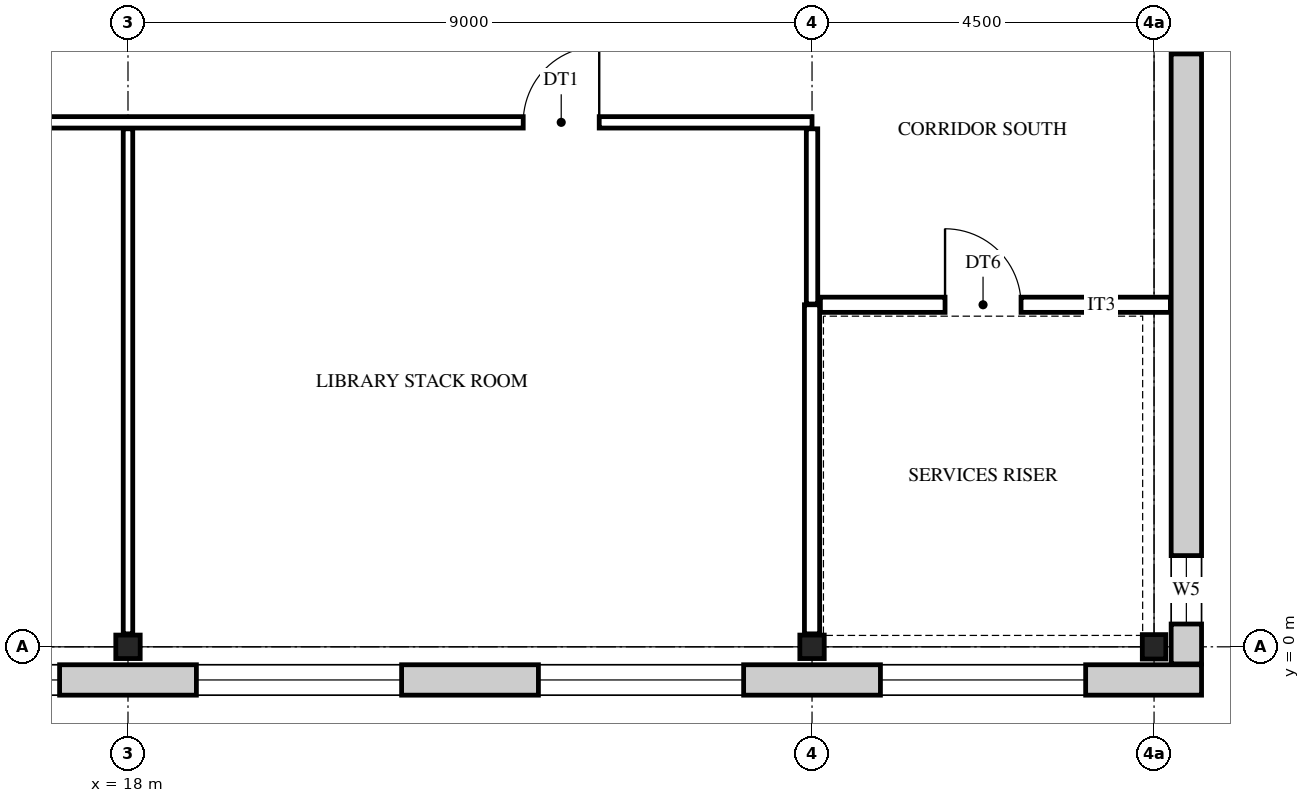
"""IFC4 building model, lengths in metres.
Left out: names, types, materials, properties, quantities, classifications, styles, units other than length and angle.
Written with IfcOpenShell. Run it as: python <this file> out.ifc"""

import sys

from ifc_helpers import new_model, si_unit, direction, frame, frame_2d, origin, origin_2d, place, context, subcontext, project, spatial, rectangle, i_section, extrude, element, fill, save


model = new_model("IFC4")
c1 = context("Model", 3, precision=1e-05, world=origin(), true_north=direction((0.0, 1.0)))
c2 = subcontext(c1, "Body", "Model", "MODEL_VIEW")
j1 = project(units=[si_unit("LENGTHUNIT", "METRE"), si_unit("PLANEANGLEUNIT", "RADIAN")], contexts=[c1])
p1 = place(None, origin())
s1 = spatial("IfcSite", under=j1, at=p1, CompositionType="ELEMENT")
p2 = place(p1, origin())
s2 = spatial("IfcBuilding", under=s1, at=p2, CompositionType="ELEMENT")
p3 = place(p2, frame((0.0, 0.0, 48.6)))
s3 = spatial("IfcBuildingStorey", under=s2, at=p3, CompositionType="ELEMENT", Elevation=48.6)
for number, where, z_axis, x_axis in (
    (1, (18.0, 0.0, 0.0), (0.0, 0.0, 1.0), (0.0, 1.0, 0.0)),
    (2, (27.0, 0.0, 0.0), (0.0, 0.0, 1.0), (0.0, 1.0, 0.0)),
    (3, (31.5, 0.0, 0.0), (0.0, 0.0, 1.0), (1.0, 0.0, 0.0)),
):
    element("IfcColumn", number, at=place(p3, frame(where, z_axis=z_axis, x_axis=x_axis)), inside=s3, PredefinedType="COLUMN", context=c2, shape_type="SweptSolid", body=[
        extrude(i_section(OverallWidth=0.309, OverallDepth=0.321, WebThickness=0.014, FlangeThickness=0.022, FilletRadius=0.017, at=origin_2d()), origin(), (0.0, 0.0, 1.0), 4.2),
    ])
p4 = place(p3, frame((32.125, -0.436, 0.0), z_axis=(0.0, 0.0, 1.0), x_axis=(-1.0, 0.0, 0.0)))
e4 = element("IfcWall", 4, at=p4, inside=s3, PredefinedType="STANDARD", context=c2, shape_type="SweptSolid", body=[
    extrude(rectangle(XDim=32.75, YDim=0.4, at=frame_2d((16.375, 0.0))), origin(), (0.0, 0.0, 1.0), 4.2),
])
p5 = place(p4, frame((28.525, 0.0, 0.9)))
e5 = element("IfcOpeningElement", 5, at=p5, cuts=e4, PredefinedType="OPENING", context=c2, shape_type="SweptSolid", body=[
    extrude(rectangle(XDim=2.7, YDim=2.5, at=frame_2d((1.35, 1.25))), frame((0.0, 0.21, 0.0), z_axis=(0.0, -1.0, 0.0), x_axis=(1.0, 0.0, 0.0)), (0.0, 0.0, 1.0), 0.42),
])
p6 = place(p4, frame((24.025, 0.0, 0.9)))
e6 = element("IfcOpeningElement", 6, at=p6, cuts=e4, PredefinedType="OPENING", context=c2, shape_type="SweptSolid", body=[
    extrude(rectangle(XDim=2.7, YDim=2.5, at=frame_2d((1.35, 1.25))), frame((0.0, 0.21, 0.0), z_axis=(0.0, -1.0, 0.0), x_axis=(1.0, 0.0, 0.0)), (0.0, 0.0, 1.0), 0.42),
])
p7 = place(p4, frame((19.525, 0.0, 0.9)))
e7 = element("IfcOpeningElement", 7, at=p7, cuts=e4, PredefinedType="OPENING", context=c2, shape_type="SweptSolid", body=[
    extrude(rectangle(XDim=2.7, YDim=2.5, at=frame_2d((1.35, 1.25))), frame((0.0, 0.21, 0.0), z_axis=(0.0, -1.0, 0.0), x_axis=(1.0, 0.0, 0.0)), (0.0, 0.0, 1.0), 0.42),
])
p8 = place(p4, frame((15.025, 0.0, 0.9)))
e8 = element("IfcOpeningElement", 8, at=p8, cuts=e4, PredefinedType="OPENING", context=c2, shape_type="SweptSolid", body=[
    extrude(rectangle(XDim=2.7, YDim=2.5, at=frame_2d((1.35, 1.25))), frame((0.0, 0.21, 0.0), z_axis=(0.0, -1.0, 0.0), x_axis=(1.0, 0.0, 0.0)), (0.0, 0.0, 1.0), 0.42),
])
p9 = place(p4, frame((10.525, 0.0, 0.9)))
e9 = element("IfcOpeningElement", 9, at=p9, cuts=e4, PredefinedType="OPENING", context=c2, shape_type="SweptSolid", body=[
    extrude(rectangle(XDim=2.7, YDim=2.5, at=frame_2d((1.35, 1.25))), frame((0.0, 0.21, 0.0), z_axis=(0.0, -1.0, 0.0), x_axis=(1.0, 0.0, 0.0)), (0.0, 0.0, 1.0), 0.42),
])
p10 = place(p4, frame((6.025, 0.0, 0.9)))
e10 = element("IfcOpeningElement", 10, at=p10, cuts=e4, PredefinedType="OPENING", context=c2, shape_type="SweptSolid", body=[
    extrude(rectangle(XDim=2.7, YDim=2.5, at=frame_2d((1.35, 1.25))), frame((0.0, 0.21, 0.0), z_axis=(0.0, -1.0, 0.0), x_axis=(1.0, 0.0, 0.0)), (0.0, 0.0, 1.0), 0.42),
])
p11 = place(p4, frame((1.525, 0.0, 0.9)))
e11 = element("IfcOpeningElement", 11, at=p11, cuts=e4, PredefinedType="OPENING", context=c2, shape_type="SweptSolid", body=[
    extrude(rectangle(XDim=2.7, YDim=2.5, at=frame_2d((1.35, 1.25))), frame((0.0, 0.21, 0.0), z_axis=(0.0, -1.0, 0.0), x_axis=(1.0, 0.0, 0.0)), (0.0, 0.0, 1.0), 0.42),
])
p12 = place(p3, frame((31.925, 27.225, 0.0), z_axis=(0.0, 0.0, 1.0), x_axis=(0.0, -1.0, 0.0)))
e12 = element("IfcWall", 12, at=p12, inside=s3, PredefinedType="STANDARD", context=c2, shape_type="SweptSolid", body=[
    extrude(rectangle(XDim=27.45, YDim=0.4, at=frame_2d((13.725, 0.0))), origin(), (0.0, 0.0, 1.0), 4.2),
])
p13 = place(p12, frame((26.025, 0.0, 0.9)))
e13 = element("IfcOpeningElement", 13, at=p13, cuts=e12, PredefinedType="OPENING", context=c2, shape_type="SweptSolid", body=[
    extrude(rectangle(XDim=0.9, YDim=2.0, at=frame_2d((0.45, 1.0))), frame((0.0, 0.21, 0.0), z_axis=(0.0, -1.0, 0.0), x_axis=(1.0, 0.0, 0.0)), (0.0, 0.0, 1.0), 0.42),
])
p14 = place(p12, frame((18.525, 0.0, 0.9)))
e14 = element("IfcOpeningElement", 14, at=p14, cuts=e12, PredefinedType="OPENING", context=c2, shape_type="SweptSolid", body=[
    extrude(rectangle(XDim=0.9, YDim=2.0, at=frame_2d((0.45, 1.0))), frame((0.0, 0.21, 0.0), z_axis=(0.0, -1.0, 0.0), x_axis=(1.0, 0.0, 0.0)), (0.0, 0.0, 1.0), 0.42),
])
p15 = place(p12, frame((15.675, 0.0, 1.6)))
e15 = element("IfcOpeningElement", 15, at=p15, cuts=e12, PredefinedType="OPENING", context=c2, shape_type="SweptSolid", body=[
    extrude(rectangle(XDim=0.6, YDim=0.9, at=frame_2d((0.3, 0.45))), frame((0.0, 0.21, 0.0), z_axis=(0.0, -1.0, 0.0), x_axis=(1.0, 0.0, 0.0)), (0.0, 0.0, 1.0), 0.42),
])
p16 = place(p12, frame((11.175, 0.0, 1.6)))
e16 = element("IfcOpeningElement", 16, at=p16, cuts=e12, PredefinedType="OPENING", context=c2, shape_type="SweptSolid", body=[
    extrude(rectangle(XDim=0.6, YDim=0.9, at=frame_2d((0.3, 0.45))), frame((0.0, 0.21, 0.0), z_axis=(0.0, -1.0, 0.0), x_axis=(1.0, 0.0, 0.0)), (0.0, 0.0, 1.0), 0.42),
])
p17 = place(p12, frame((8.025, 0.0, 0.9)))
e17 = element("IfcOpeningElement", 17, at=p17, cuts=e12, PredefinedType="OPENING", context=c2, shape_type="SweptSolid", body=[
    extrude(rectangle(XDim=0.9, YDim=2.0, at=frame_2d((0.45, 1.0))), frame((0.0, 0.21, 0.0), z_axis=(0.0, -1.0, 0.0), x_axis=(1.0, 0.0, 0.0)), (0.0, 0.0, 1.0), 0.42),
])
p18 = place(p12, frame((0.525, 0.0, 0.9)))
e18 = element("IfcOpeningElement", 18, at=p18, cuts=e12, PredefinedType="OPENING", context=c2, shape_type="SweptSolid", body=[
    extrude(rectangle(XDim=0.9, YDim=2.0, at=frame_2d((0.45, 1.0))), frame((0.0, 0.21, 0.0), z_axis=(0.0, -1.0, 0.0), x_axis=(1.0, 0.0, 0.0)), (0.0, 0.0, 1.0), 0.42),
])
p19 = place(p3, frame((18.0, 0.17, 0.0), z_axis=(0.0, 0.0, 1.0), x_axis=(0.0, 1.0, 0.0)))
e19 = element("IfcWall", 19, at=p19, inside=s3, PredefinedType="PARTITIONING", context=c2, shape_type="SweptSolid", body=[
    extrude(rectangle(XDim=6.645, YDim=0.125, at=frame_2d((3.322, 0.0))), origin(), (0.0, 0.0, 1.0), 3.542),
])
p20 = place(p3, frame((27.0, 0.17, 0.0), z_axis=(0.0, 0.0, 1.0), x_axis=(0.0, 1.0, 0.0)))
e20 = element("IfcWall", 20, at=p20, inside=s3, PredefinedType="PARTITIONING", context=c2, shape_type="SweptSolid", body=[
    extrude(rectangle(XDim=4.33, YDim=0.2, at=frame_2d((2.165, 0.0))), origin(), (0.0, 0.0, 1.0), 3.542),
])
p21 = place(p3, frame((27.0, 4.51, 0.0), z_axis=(0.0, 0.0, 1.0), x_axis=(0.0, 1.0, 0.0)))
e21 = element("IfcWall", 21, at=p21, inside=s3, PredefinedType="PARTITIONING", context=c2, shape_type="SweptSolid", body=[
    extrude(rectangle(XDim=2.305, YDim=0.15, at=frame_2d((1.152, 0.0))), origin(), (0.0, 0.0, 1.0), 3.542),
])
p22 = place(p3, frame((27.11, 4.5, 0.0), z_axis=(0.0, 0.0, 1.0), x_axis=(1.0, 0.0, 0.0)))
e22 = element("IfcWall", 22, at=p22, inside=s3, PredefinedType="PARTITIONING", context=c2, shape_type="SweptSolid", body=[
    extrude(rectangle(XDim=4.605, YDim=0.2, at=frame_2d((2.302, 0.0))), origin(), (0.0, 0.0, 1.0), 3.542),
])
p23 = place(p22, frame((1.64, 0.0, 0.0)))
e23 = element("IfcOpeningElement", 23, at=p23, cuts=e22, PredefinedType="OPENING", context=c2, shape_type="SweptSolid", body=[
    extrude(rectangle(XDim=1.0, YDim=2.1, at=frame_2d((0.5, 1.05))), frame((0.0, 0.11, 0.0), z_axis=(0.0, -1.0, 0.0), x_axis=(1.0, 0.0, 0.0)), (0.0, 0.0, 1.0), 0.22),
])
p24 = place(p3, frame((6.9, 6.9, 0.0), z_axis=(0.0, 0.0, 1.0), x_axis=(1.0, 0.0, 0.0)))
e24 = element("IfcWall", 24, at=p24, inside=s3, PredefinedType="PARTITIONING", context=c2, shape_type="SweptSolid", body=[
    extrude(rectangle(XDim=20.1, YDim=0.15, at=frame_2d((10.05, 0.0))), origin(), (0.0, 0.0, 1.0), 3.542),
])
p25 = place(p24, frame((0.7, 0.0, 0.0)))
e25 = element("IfcOpeningElement", 25, at=p25, cuts=e24, PredefinedType="OPENING", context=c2, shape_type="SweptSolid", body=[
    extrude(rectangle(XDim=1.0, YDim=2.1, at=frame_2d((0.5, 1.05))), frame((0.0, 0.085, 0.0), z_axis=(0.0, -1.0, 0.0), x_axis=(1.0, 0.0, 0.0)), (0.0, 0.0, 1.0), 0.17),
])
p26 = place(p24, frame((7.3, 0.0, 0.0)))
e26 = element("IfcOpeningElement", 26, at=p26, cuts=e24, PredefinedType="OPENING", context=c2, shape_type="SweptSolid", body=[
    extrude(rectangle(XDim=1.0, YDim=2.1, at=frame_2d((0.5, 1.05))), frame((0.0, 0.085, 0.0), z_axis=(0.0, -1.0, 0.0), x_axis=(1.0, 0.0, 0.0)), (0.0, 0.0, 1.0), 0.17),
])
p27 = place(p24, frame((16.3, 0.0, 0.0)))
e27 = element("IfcOpeningElement", 27, at=p27, cuts=e24, PredefinedType="OPENING", context=c2, shape_type="SweptSolid", body=[
    extrude(rectangle(XDim=1.0, YDim=2.1, at=frame_2d((0.5, 1.05))), frame((0.0, 0.085, 0.0), z_axis=(0.0, -1.0, 0.0), x_axis=(1.0, 0.0, 0.0)), (0.0, 0.0, 1.0), 0.17),
])
p28 = place(p8, origin())
e28 = element("IfcWindow", 28, at=p28, inside=s3, PartitioningType="SINGLE_PANEL", PredefinedType="WINDOW", context=c2, shape_type="SweptSolid", body=[
    extrude(rectangle(XDim=2.7, YDim=2.5, at=frame_2d((1.35, 1.25))), frame((0.0, 0.03, 0.0), z_axis=(0.0, -1.0, 0.0), x_axis=(1.0, 0.0, 0.0)), (0.0, 0.0, 1.0), 0.06),
])
fill(e8, e28)
p29 = place(p9, origin())
e29 = element("IfcWindow", 29, at=p29, inside=s3, PartitioningType="SINGLE_PANEL", PredefinedType="WINDOW", context=c2, shape_type="SweptSolid", body=[
    extrude(rectangle(XDim=2.7, YDim=2.5, at=frame_2d((1.35, 1.25))), frame((0.0, 0.03, 0.0), z_axis=(0.0, -1.0, 0.0), x_axis=(1.0, 0.0, 0.0)), (0.0, 0.0, 1.0), 0.06),
])
fill(e9, e29)
p30 = place(p10, origin())
e30 = element("IfcWindow", 30, at=p30, inside=s3, PartitioningType="SINGLE_PANEL", PredefinedType="WINDOW", context=c2, shape_type="SweptSolid", body=[
    extrude(rectangle(XDim=2.7, YDim=2.5, at=frame_2d((1.35, 1.25))), frame((0.0, 0.03, 0.0), z_axis=(0.0, -1.0, 0.0), x_axis=(1.0, 0.0, 0.0)), (0.0, 0.0, 1.0), 0.06),
])
fill(e10, e30)
p31 = place(p11, origin())
e31 = element("IfcWindow", 31, at=p31, inside=s3, PartitioningType="SINGLE_PANEL", PredefinedType="WINDOW", context=c2, shape_type="SweptSolid", body=[
    extrude(rectangle(XDim=2.7, YDim=2.5, at=frame_2d((1.35, 1.25))), frame((0.0, 0.03, 0.0), z_axis=(0.0, -1.0, 0.0), x_axis=(1.0, 0.0, 0.0)), (0.0, 0.0, 1.0), 0.06),
])
fill(e11, e31)
p32 = place(p13, origin())
e32 = element("IfcWindow", 32, at=p32, inside=s3, PartitioningType="SINGLE_PANEL", PredefinedType="WINDOW", context=c2, shape_type="SweptSolid", body=[
    extrude(rectangle(XDim=0.9, YDim=2.0, at=frame_2d((0.45, 1.0))), frame((0.0, 0.03, 0.0), z_axis=(0.0, -1.0, 0.0), x_axis=(1.0, 0.0, 0.0)), (0.0, 0.0, 1.0), 0.06),
])
fill(e13, e32)
p33 = place(p14, origin())
e33 = element("IfcWindow", 33, at=p33, inside=s3, PartitioningType="SINGLE_PANEL", PredefinedType="WINDOW", context=c2, shape_type="SweptSolid", body=[
    extrude(rectangle(XDim=0.9, YDim=2.0, at=frame_2d((0.45, 1.0))), frame((0.0, 0.03, 0.0), z_axis=(0.0, -1.0, 0.0), x_axis=(1.0, 0.0, 0.0)), (0.0, 0.0, 1.0), 0.06),
])
fill(e14, e33)
p34 = place(p23, frame((1.0, 0.0, 0.0), z_axis=(0.0, 0.0, 1.0), x_axis=(-1.0, 0.0, 0.0)))
e34 = element("IfcDoor", 34, at=p34, inside=s3, OperationType="SINGLE_SWING_LEFT", PredefinedType="DOOR", context=c2, shape_type="SweptSolid", body=[
    extrude(rectangle(XDim=1.0, YDim=2.1, at=frame_2d((0.5, 1.05))), frame((0.0, 0.025, 0.0), z_axis=(0.0, -1.0, 0.0), x_axis=(1.0, 0.0, 0.0)), (0.0, 0.0, 1.0), 0.05),
])
fill(e23, e34)
p35 = place(p27, frame((1.0, 0.0, 0.0), z_axis=(0.0, 0.0, 1.0), x_axis=(-1.0, 0.0, 0.0)))
e35 = element("IfcDoor", 35, at=p35, inside=s3, OperationType="SINGLE_SWING_RIGHT", PredefinedType="DOOR", context=c2, shape_type="SweptSolid", body=[
    extrude(rectangle(XDim=1.0, YDim=2.1, at=frame_2d((0.5, 1.05))), frame((0.0, 0.025, 0.0), z_axis=(0.0, -1.0, 0.0), x_axis=(1.0, 0.0, 0.0)), (0.0, 0.0, 1.0), 0.05),
])
fill(e27, e35)
save(model, sys.argv[1])
